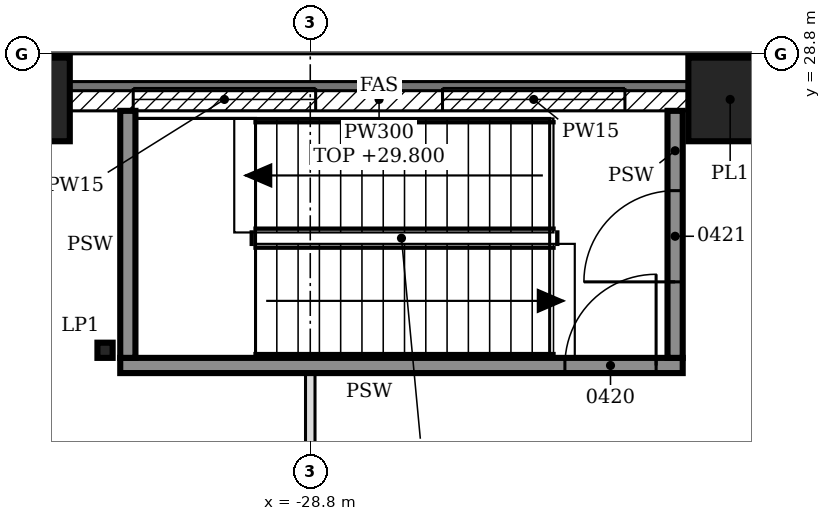
"""IFC4 building model, lengths in metres.
Left out: names, types, materials, properties, quantities, classifications, styles, units other than length and angle.
Written with IfcOpenShell. Run it as: python <this file> out.ifc"""

import sys

from ifc_helpers import new_model, si_unit, direction, frame, frame_2d, origin, origin_2d, place, context, subcontext, project, spatial, polyline, rectangle, hollow_rectangle, i_section, outline, extrude, element, fill, save


model = new_model("IFC4")
c1 = context("Model", 3, precision=1e-05, world=origin(), true_north=direction((0.0, 1.0)))
c2 = subcontext(c1, "Body", "Model", "MODEL_VIEW")
j1 = project(units=[si_unit("LENGTHUNIT", "METRE"), si_unit("PLANEANGLEUNIT", "RADIAN")], contexts=[c1])
p1 = place(None, origin())
s1 = spatial("IfcSite", under=j1, at=p1, CompositionType="ELEMENT")
p2 = place(p1, origin())
s2 = spatial("IfcBuilding", under=s1, at=p2, CompositionType="ELEMENT")
p3 = place(p2, frame((0.0, 0.0, 25.8)))
s3 = spatial("IfcBuildingStorey", under=s2, at=p3, CompositionType="ELEMENT", Elevation=25.8)
for number, where, z_axis, x_axis in (
    (1, (-23.276, 28.2, 0.0), (0.0, 0.0, 1.0), (1.0, 0.0, 0.0)),
    (2, (-32.514, 28.2, 0.0), (0.0, 0.0, 1.0), (1.0, 0.0, 0.0)),
):
    element("IfcColumn", number, at=place(p3, frame(where, z_axis=z_axis, x_axis=x_axis)), inside=s3, PredefinedType="COLUMN", context=c2, shape_type="SweptSolid", body=[
        extrude(hollow_rectangle(XDim=1.1, YDim=1.1, WallThickness=0.06, at=origin_2d()), origin(), (0.0, 0.0, 1.0), 4.8),
    ])
p4 = place(p3, frame((-31.5, 24.9, 0.0), z_axis=(0.0, 0.0, 1.0), x_axis=(1.0, 0.0, 0.0)))
e3 = element("IfcColumn", 3, at=p4, inside=s3, PredefinedType="COLUMN", context=c2, shape_type="SweptSolid", body=[
    extrude(i_section(OverallWidth=0.2, OverallDepth=0.2, WebThickness=0.009, FlangeThickness=0.015, FilletRadius=0.018, at=origin_2d()), origin(), (0.0, 0.0, 1.0), 4.8),
])
p5 = place(p3, frame((-23.826, 28.2, 0.0), z_axis=(0.0, 0.0, 1.0), x_axis=(-1.0, 0.0, 0.0)))
e4 = element("IfcWall", 4, at=p5, inside=s3, PredefinedType="SOLIDWALL", context=c2, shape_type="SweptSolid", body=[
    extrude(rectangle(XDim=8.138, YDim=0.3, at=frame_2d((4.069, 0.0))), origin(), (0.0, 0.0, 1.0), 4.0),
])
p6 = place(p5, frame((0.834, 0.0, 0.9)))
e5 = element("IfcOpeningElement", 5, at=p6, cuts=e4, PredefinedType="OPENING", context=c2, shape_type="SweptSolid", body=[
    extrude(rectangle(XDim=2.4, YDim=1.5, at=frame_2d((1.2, 0.75))), frame((0.0, 0.16, 0.0), z_axis=(0.0, -1.0, 0.0), x_axis=(1.0, 0.0, 0.0)), (0.0, 0.0, 1.0), 0.32),
])
p7 = place(p5, frame((4.903, 0.0, 0.9)))
e6 = element("IfcOpeningElement", 6, at=p7, cuts=e4, PredefinedType="OPENING", context=c2, shape_type="SweptSolid", body=[
    extrude(rectangle(XDim=2.4, YDim=1.5, at=frame_2d((1.2, 0.75))), frame((0.0, 0.16, 0.0), z_axis=(0.0, -1.0, 0.0), x_axis=(1.0, 0.0, 0.0)), (0.0, 0.0, 1.0), 0.32),
])
p8 = place(p3, frame((-28.8, -24.6, 0.0), z_axis=(0.0, 0.0, 1.0), x_axis=(0.0, 1.0, 0.0)))
e7 = element("IfcWall", 7, at=p8, inside=s3, PredefinedType="PARTITIONING", context=c2, shape_type="SweptSolid", body=[
    extrude(outline(polyline([(0.0, 0.0), (49.2, 0.0), (49.2, 4.6), (43.95, 4.6), (43.948, 3.98), (43.65, 3.98), (43.648, 4.6), (39.15, 4.6), (39.148, 3.98), (38.85, 3.98), (38.848, 4.6), (34.35, 4.6), (34.348, 3.98), (34.05, 3.98), (34.048, 4.6), (29.55, 4.6), (29.548, 3.98), (29.25, 3.98), (29.248, 4.6), (24.75, 4.6), (24.748, 3.98), (24.45, 3.98), (24.448, 4.6), (19.95, 4.6), (19.948, 3.98), (19.65, 3.98), (19.648, 4.6), (15.15, 4.6), (15.148, 3.98), (14.85, 3.98), (14.848, 4.6), (10.35, 4.6), (10.348, 3.98), (10.05, 3.98), (10.048, 4.6), (5.55, 4.6), (5.548, 3.98), (5.25, 3.98), (5.248, 4.6), (0.0, 4.6), (0.0, 0.0)])), frame((0.0, 0.062, 0.0), z_axis=(0.0, -1.0, 0.0), x_axis=(1.0, 0.0, 0.0)), (0.0, 0.0, 1.0), 0.125),
])
p9 = place(p8, frame((1.7, 0.0, 0.0)))
e8 = element("IfcOpeningElement", 8, at=p9, cuts=e7, PredefinedType="OPENING", context=c2, shape_type="SweptSolid", body=[
    extrude(rectangle(XDim=1.8, YDim=2.1, at=frame_2d((0.9, 1.05))), frame((0.0, 0.073, 0.0), z_axis=(0.0, -1.0, 0.0), x_axis=(1.0, 0.0, 0.0)), (0.0, 0.0, 1.0), 0.145),
])
p10 = place(p8, frame((8.05, 0.0, 0.0)))
e9 = element("IfcOpeningElement", 9, at=p10, cuts=e7, PredefinedType="OPENING", context=c2, shape_type="SweptSolid", body=[
    extrude(rectangle(XDim=1.8, YDim=2.1, at=frame_2d((0.9, 1.05))), frame((0.0, 0.073, 0.0), z_axis=(0.0, -1.0, 0.0), x_axis=(1.0, 0.0, 0.0)), (0.0, 0.0, 1.0), 0.145),
])
p11 = place(p8, frame((14.7, 0.0, 0.0)))
e10 = element("IfcOpeningElement", 10, at=p11, cuts=e7, PredefinedType="OPENING", context=c2, shape_type="SweptSolid", body=[
    extrude(rectangle(XDim=1.8, YDim=2.1, at=frame_2d((0.9, 1.05))), frame((0.0, 0.073, 0.0), z_axis=(0.0, -1.0, 0.0), x_axis=(1.0, 0.0, 0.0)), (0.0, 0.0, 1.0), 0.145),
])
p12 = place(p8, frame((21.2, 0.0, 0.0)))
e11 = element("IfcOpeningElement", 11, at=p12, cuts=e7, PredefinedType="OPENING", context=c2, shape_type="SweptSolid", body=[
    extrude(rectangle(XDim=1.8, YDim=2.1, at=frame_2d((0.9, 1.05))), frame((0.0, 0.073, 0.0), z_axis=(0.0, -1.0, 0.0), x_axis=(1.0, 0.0, 0.0)), (0.0, 0.0, 1.0), 0.145),
])
p13 = place(p8, frame((26.2, 0.0, 0.0)))
e12 = element("IfcOpeningElement", 12, at=p13, cuts=e7, PredefinedType="OPENING", context=c2, shape_type="SweptSolid", body=[
    extrude(rectangle(XDim=1.8, YDim=2.1, at=frame_2d((0.9, 1.05))), frame((0.0, 0.073, 0.0), z_axis=(0.0, -1.0, 0.0), x_axis=(1.0, 0.0, 0.0)), (0.0, 0.0, 1.0), 0.145),
])
p14 = place(p8, frame((32.7, 0.0, 0.0)))
e13 = element("IfcOpeningElement", 13, at=p14, cuts=e7, PredefinedType="OPENING", context=c2, shape_type="SweptSolid", body=[
    extrude(rectangle(XDim=1.8, YDim=2.1, at=frame_2d((0.9, 1.05))), frame((0.0, 0.073, 0.0), z_axis=(0.0, -1.0, 0.0), x_axis=(1.0, 0.0, 0.0)), (0.0, 0.0, 1.0), 0.145),
])
p15 = place(p8, frame((39.35, 0.0, 0.0)))
e14 = element("IfcOpeningElement", 14, at=p15, cuts=e7, PredefinedType="OPENING", context=c2, shape_type="SweptSolid", body=[
    extrude(rectangle(XDim=1.8, YDim=2.1, at=frame_2d((0.9, 1.05))), frame((0.0, 0.073, 0.0), z_axis=(0.0, -1.0, 0.0), x_axis=(1.0, 0.0, 0.0)), (0.0, 0.0, 1.0), 0.145),
])
p16 = place(p8, frame((45.7, 0.0, 0.0)))
e15 = element("IfcOpeningElement", 15, at=p16, cuts=e7, PredefinedType="OPENING", context=c2, shape_type="SweptSolid", body=[
    extrude(rectangle(XDim=1.8, YDim=2.1, at=frame_2d((0.9, 1.05))), frame((0.0, 0.073, 0.0), z_axis=(0.0, -1.0, 0.0), x_axis=(1.0, 0.0, 0.0)), (0.0, 0.0, 1.0), 0.145),
])
p17 = place(p3, frame((-31.3, 24.7, 0.0), z_axis=(0.0, 0.0, 1.0), x_axis=(1.0, 0.0, 0.0)))
e16 = element("IfcWall", 16, at=p17, inside=s3, PredefinedType="SOLIDWALL", context=c2, shape_type="SweptSolid", body=[
    extrude(rectangle(XDim=7.4, YDim=0.2, at=frame_2d((3.7, 0.0))), origin(), (0.0, 0.0, 1.0), 4.6),
])
p18 = place(p17, frame((5.85, 0.0, 0.0)))
e17 = element("IfcOpeningElement", 17, at=p18, cuts=e16, PredefinedType="OPENING", context=c2, shape_type="SweptSolid", body=[
    extrude(rectangle(XDim=1.2, YDim=2.1, at=frame_2d((0.6, 1.05))), frame((0.0, 0.11, 0.0), z_axis=(0.0, -1.0, 0.0), x_axis=(1.0, 0.0, 0.0)), (0.0, 0.0, 1.0), 0.22),
])
p19 = place(p3, frame((-31.2, 24.8, 0.0), z_axis=(0.0, 0.0, 1.0), x_axis=(0.0, 1.0, 0.0)))
e18 = element("IfcWall", 18, at=p19, inside=s3, PredefinedType="SOLIDWALL", context=c2, shape_type="SweptSolid", body=[
    extrude(rectangle(XDim=3.25, YDim=0.2, at=frame_2d((1.625, 0.0))), origin(), (0.0, 0.0, 1.0), 4.6),
])
p20 = place(p3, frame((-24.0, 24.8, 0.0), z_axis=(0.0, 0.0, 1.0), x_axis=(0.0, 1.0, 0.0)))
e19 = element("IfcWall", 19, at=p20, inside=s3, PredefinedType="SOLIDWALL", context=c2, shape_type="SweptSolid", body=[
    extrude(rectangle(XDim=3.25, YDim=0.2, at=frame_2d((1.625, 0.0))), origin(), (0.0, 0.0, 1.0), 4.6),
])
p21 = place(p20, frame((1.0, 0.0, 0.0)))
e20 = element("IfcOpeningElement", 20, at=p21, cuts=e19, PredefinedType="OPENING", context=c2, shape_type="SweptSolid", body=[
    extrude(rectangle(XDim=1.2, YDim=2.1, at=frame_2d((0.6, 1.05))), frame((0.0, 0.11, 0.0), z_axis=(0.0, -1.0, 0.0), x_axis=(1.0, 0.0, 0.0)), (0.0, 0.0, 1.0), 0.22),
])
p22 = place(p6, origin())
e21 = element("IfcWindow", 21, at=p22, inside=s3, PartitioningType="SINGLE_PANEL", PredefinedType="WINDOW", context=c2, shape_type="SweptSolid", body=[
    extrude(rectangle(XDim=2.4, YDim=1.5, at=frame_2d((1.2, 0.75))), frame((0.0, 0.03, 0.0), z_axis=(0.0, -1.0, 0.0), x_axis=(1.0, 0.0, 0.0)), (0.0, 0.0, 1.0), 0.06),
])
fill(e5, e21)
p23 = place(p7, origin())
e22 = element("IfcWindow", 22, at=p23, inside=s3, PartitioningType="SINGLE_PANEL", PredefinedType="WINDOW", context=c2, shape_type="SweptSolid", body=[
    extrude(rectangle(XDim=2.4, YDim=1.5, at=frame_2d((1.2, 0.75))), frame((0.0, 0.03, 0.0), z_axis=(0.0, -1.0, 0.0), x_axis=(1.0, 0.0, 0.0)), (0.0, 0.0, 1.0), 0.06),
])
fill(e6, e22)
p24 = place(p18, origin())
e23 = element("IfcDoor", 23, at=p24, inside=s3, OperationType="SINGLE_SWING_RIGHT", PredefinedType="DOOR", context=c2, shape_type="SweptSolid", body=[
    extrude(rectangle(XDim=1.2, YDim=2.1, at=frame_2d((0.6, 1.05))), frame((0.0, 0.025, 0.0), z_axis=(0.0, -1.0, 0.0), x_axis=(1.0, 0.0, 0.0)), (0.0, 0.0, 1.0), 0.05),
])
fill(e17, e23)
p25 = place(p21, origin())
e24 = element("IfcDoor", 24, at=p25, inside=s3, OperationType="SINGLE_SWING_LEFT", PredefinedType="DOOR", context=c2, shape_type="SweptSolid", body=[
    extrude(rectangle(XDim=1.2, YDim=2.1, at=frame_2d((0.6, 1.05))), frame((0.0, 0.025, 0.0), z_axis=(0.0, -1.0, 0.0), x_axis=(1.0, 0.0, 0.0)), (0.0, 0.0, 1.0), 0.05),
])
fill(e20, e24)
save(model, sys.argv[1])
